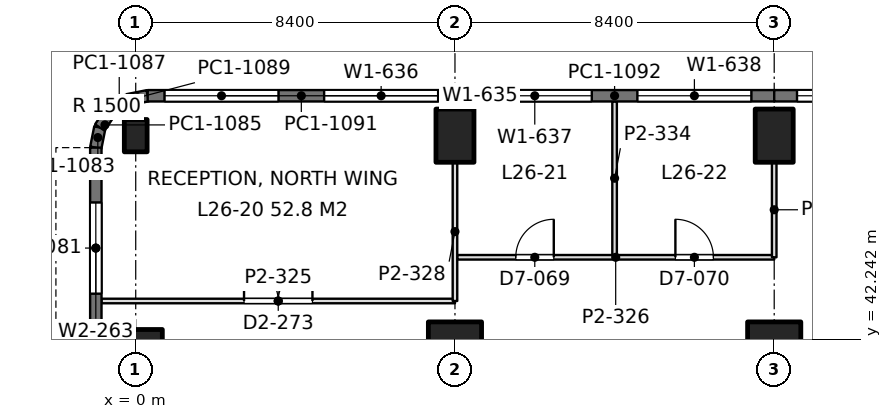
"""IFC4 building model, lengths in metres.
Left out: names, types, materials, properties, quantities, classifications, styles, units other than length and angle.
Written with IfcOpenShell. Run it as: python <this file> out.ifc"""

import sys

from ifc_helpers import new_model, si_unit, direction, frame, frame_2d, origin, origin_2d, place, context, subcontext, project, spatial, rectangle, extrude, element, fill, save


model = new_model("IFC4")
c1 = context("Model", 3, precision=1e-05, world=origin(), true_north=direction((0.0, 1.0)))
c2 = subcontext(c1, "Body", "Model", "MODEL_VIEW")
j1 = project(units=[si_unit("LENGTHUNIT", "METRE"), si_unit("PLANEANGLEUNIT", "RADIAN")], contexts=[c1])
p1 = place(None, origin())
s1 = spatial("IfcSite", under=j1, at=p1, CompositionType="ELEMENT")
p2 = place(p1, origin())
s2 = spatial("IfcBuilding", under=s1, at=p2, CompositionType="ELEMENT")
p3 = place(p2, frame((0.0, 0.0, 117.6)))
s3 = spatial("IfcBuildingStorey", under=s2, at=p3, CompositionType="ELEMENT", Elevation=117.6)
p4 = place(p3, frame((0.0, 42.0, 0.0), z_axis=(0.0, 0.0, 1.0), x_axis=(0.0, 1.0, 0.0)))
e1 = element("IfcColumn", 1, at=p4, inside=s3, PredefinedType="COLUMN", context=c2, shape_type="SweptSolid", body=[
    extrude(rectangle(XDim=1.0, YDim=1.4, at=origin_2d()), origin(), (0.0, 0.0, 1.0), 4.2),
])
p5 = place(p3, frame((0.0, 47.6, 0.0), z_axis=(0.0, 0.0, 1.0), x_axis=(1.0, 0.0, 0.0)))
e2 = element("IfcColumn", 2, at=p5, inside=s3, PredefinedType="COLUMN", context=c2, shape_type="SweptSolid", body=[
    extrude(rectangle(XDim=0.6, YDim=0.85, at=origin_2d()), origin(), (0.0, 0.0, 1.0), 4.2),
])
p6 = place(p3, frame((8.4, 42.0, 0.0), z_axis=(0.0, 0.0, 1.0), x_axis=(1.0, 0.0, 0.0)))
e3 = element("IfcColumn", 3, at=p6, inside=s3, PredefinedType="COLUMN", context=c2, shape_type="SweptSolid", body=[
    extrude(rectangle(XDim=1.4, YDim=1.4, at=origin_2d()), origin(), (0.0, 0.0, 1.0), 4.2),
])
p7 = place(p3, frame((8.4, 47.6, 0.0), z_axis=(0.0, 0.0, 1.0), x_axis=(1.0, 0.0, 0.0)))
e4 = element("IfcColumn", 4, at=p7, inside=s3, PredefinedType="COLUMN", context=c2, shape_type="SweptSolid", body=[
    extrude(rectangle(XDim=1.0, YDim=1.4, at=origin_2d()), origin(), (0.0, 0.0, 1.0), 4.2),
])
p8 = place(p3, frame((16.8, 42.0, 0.0), z_axis=(0.0, 0.0, 1.0), x_axis=(1.0, 0.0, 0.0)))
e5 = element("IfcColumn", 5, at=p8, inside=s3, PredefinedType="COLUMN", context=c2, shape_type="SweptSolid", body=[
    extrude(rectangle(XDim=1.4, YDim=1.4, at=origin_2d()), origin(), (0.0, 0.0, 1.0), 4.2),
])
p9 = place(p3, frame((16.8, 47.6, 0.0), z_axis=(0.0, 0.0, 1.0), x_axis=(1.0, 0.0, 0.0)))
e6 = element("IfcColumn", 6, at=p9, inside=s3, PredefinedType="COLUMN", context=c2, shape_type="SweptSolid", body=[
    extrude(rectangle(XDim=1.0, YDim=1.4, at=origin_2d()), origin(), (0.0, 0.0, 1.0), 4.2),
])
p10 = place(p3, frame((-1.05, 42.0, 0.0), z_axis=(0.0, 0.0, 1.0), x_axis=(0.0, 1.0, 0.0)))
e7 = element("IfcWall", 7, at=p10, inside=s3, PredefinedType="SOLIDWALL", context=c2, shape_type="SweptSolid", body=[
    extrude(rectangle(XDim=5.285, YDim=0.3, at=frame_2d((2.643, 0.0))), origin(), (0.0, 0.0, 1.0), 4.05),
])
p11 = place(p10, frame((1.443, 0.0, 0.9)))
e8 = element("IfcOpeningElement", 8, at=p11, cuts=e7, PredefinedType="OPENING", context=c2, shape_type="SweptSolid", body=[
    extrude(rectangle(XDim=2.4, YDim=1.9, at=frame_2d((1.2, 0.95))), frame((0.0, 0.16, 0.0), z_axis=(0.0, -1.0, 0.0), x_axis=(1.0, 0.0, 0.0)), (0.0, 0.0, 1.0), 0.32),
])
p12 = place(p3, frame((-1.05, 47.285, 0.0), z_axis=(0.0, 0.0, 1.0), x_axis=(0.195073962632, 0.980788534345, 0.0)))
e9 = element("IfcWall", 9, at=p12, inside=s3, PredefinedType="SOLIDWALL", context=c2, shape_type="SweptSolid", body=[
    extrude(rectangle(XDim=0.541, YDim=0.3, at=frame_2d((0.271, 0.0))), origin(), (0.0, 0.0, 1.0), 4.05),
])
p13 = place(p3, frame((-0.945, 47.815, 0.0), z_axis=(0.0, 0.0, 1.0), x_axis=(0.55534295404, 0.831621430339, 0.0)))
e10 = element("IfcWall", 10, at=p13, inside=s3, PredefinedType="SOLIDWALL", context=c2, shape_type="SweptSolid", body=[
    extrude(rectangle(XDim=0.526, YDim=0.3, at=frame_2d((0.263, 0.0))), origin(), (0.0, 0.0, 1.0), 4.05),
])
p14 = place(p3, frame((-0.653, 48.253, 0.0), z_axis=(0.0, 0.0, 1.0), x_axis=(0.831692711774, 0.555236195849, 0.0)))
e11 = element("IfcWall", 11, at=p14, inside=s3, PredefinedType="SOLIDWALL", context=c2, shape_type="SweptSolid", body=[
    extrude(rectangle(XDim=0.525, YDim=0.3, at=frame_2d((0.263, 0.0))), origin(), (0.0, 0.0, 1.0), 4.05),
])
p15 = place(p3, frame((-0.216, 48.544, 0.0), z_axis=(0.0, 0.0, 1.0), x_axis=(0.980788534345, 0.195073962632, 0.0)))
e12 = element("IfcWall", 12, at=p15, inside=s3, PredefinedType="SOLIDWALL", context=c2, shape_type="SweptSolid", body=[
    extrude(rectangle(XDim=0.541, YDim=0.3, at=frame_2d((0.271, 0.0))), origin(), (0.0, 0.0, 1.0), 4.05),
])
p16 = place(p3, frame((0.315, 48.65, 0.0), z_axis=(0.0, 0.0, 1.0), x_axis=(1.0, 0.0, 0.0)))
e13 = element("IfcWall", 13, at=p16, inside=s3, PredefinedType="SOLIDWALL", context=c2, shape_type="SweptSolid", body=[
    extrude(rectangle(XDim=8.085, YDim=0.3, at=frame_2d((4.042, 0.0))), origin(), (0.0, 0.0, 1.0), 4.05),
])
p17 = place(p16, frame((0.443, 0.0, 0.9)))
e14 = element("IfcOpeningElement", 14, at=p17, cuts=e13, PredefinedType="OPENING", context=c2, shape_type="SweptSolid", body=[
    extrude(rectangle(XDim=3.0, YDim=1.9, at=frame_2d((1.5, 0.95))), frame((0.0, 0.16, 0.0), z_axis=(0.0, -1.0, 0.0), x_axis=(1.0, 0.0, 0.0)), (0.0, 0.0, 1.0), 0.32),
])
p18 = place(p16, frame((4.643, 0.0, 0.9)))
e15 = element("IfcOpeningElement", 15, at=p18, cuts=e13, PredefinedType="OPENING", context=c2, shape_type="SweptSolid", body=[
    extrude(rectangle(XDim=3.0, YDim=1.9, at=frame_2d((1.5, 0.95))), frame((0.0, 0.16, 0.0), z_axis=(0.0, -1.0, 0.0), x_axis=(1.0, 0.0, 0.0)), (0.0, 0.0, 1.0), 0.32),
])
p19 = place(p3, frame((8.4, 48.65, 0.0), z_axis=(0.0, 0.0, 1.0), x_axis=(1.0, 0.0, 0.0)))
e16 = element("IfcWall", 16, at=p19, inside=s3, PredefinedType="SOLIDWALL", context=c2, shape_type="SweptSolid", body=[
    extrude(rectangle(XDim=8.4, YDim=0.3, at=frame_2d((4.2, 0.0))), origin(), (0.0, 0.0, 1.0), 4.05),
])
p20 = place(p19, frame((0.6, 0.0, 0.9)))
e17 = element("IfcOpeningElement", 17, at=p20, cuts=e16, PredefinedType="OPENING", context=c2, shape_type="SweptSolid", body=[
    extrude(rectangle(XDim=3.0, YDim=1.9, at=frame_2d((1.5, 0.95))), frame((0.0, 0.16, 0.0), z_axis=(0.0, -1.0, 0.0), x_axis=(1.0, 0.0, 0.0)), (0.0, 0.0, 1.0), 0.32),
])
p21 = place(p19, frame((4.8, 0.0, 0.9)))
e18 = element("IfcOpeningElement", 18, at=p21, cuts=e16, PredefinedType="OPENING", context=c2, shape_type="SweptSolid", body=[
    extrude(rectangle(XDim=3.0, YDim=1.9, at=frame_2d((1.5, 0.95))), frame((0.0, 0.16, 0.0), z_axis=(0.0, -1.0, 0.0), x_axis=(1.0, 0.0, 0.0)), (0.0, 0.0, 1.0), 0.32),
])
p22 = place(p3, frame((16.8, 48.65, 0.0), z_axis=(0.0, 0.0, 1.0), x_axis=(1.0, 0.0, 0.0)))
e19 = element("IfcWall", 19, at=p22, inside=s3, PredefinedType="SOLIDWALL", context=c2, shape_type="SweptSolid", body=[
    extrude(rectangle(XDim=8.4, YDim=0.3, at=frame_2d((4.2, 0.0))), origin(), (0.0, 0.0, 1.0), 4.05),
])
p23 = place(p22, frame((0.6, 0.0, 0.9)))
e20 = element("IfcOpeningElement", 20, at=p23, cuts=e19, PredefinedType="OPENING", context=c2, shape_type="SweptSolid", body=[
    extrude(rectangle(XDim=3.0, YDim=1.9, at=frame_2d((1.5, 0.95))), frame((0.0, 0.16, 0.0), z_axis=(0.0, -1.0, 0.0), x_axis=(1.0, 0.0, 0.0)), (0.0, 0.0, 1.0), 0.32),
])
p24 = place(p22, frame((4.8, 0.0, 0.9)))
e21 = element("IfcOpeningElement", 21, at=p24, cuts=e19, PredefinedType="OPENING", context=c2, shape_type="SweptSolid", body=[
    extrude(rectangle(XDim=3.0, YDim=1.9, at=frame_2d((1.5, 0.95))), frame((0.0, 0.16, 0.0), z_axis=(0.0, -1.0, 0.0), x_axis=(1.0, 0.0, 0.0)), (0.0, 0.0, 1.0), 0.32),
])
p25 = place(p3, frame((-0.902, 43.25, 0.0), z_axis=(0.0, 0.0, 1.0), x_axis=(1.0, 0.0, 0.0)))
e22 = element("IfcWall", 22, at=p25, inside=s3, PredefinedType="PARTITIONING", context=c2, shape_type="SweptSolid", body=[
    extrude(rectangle(XDim=9.302, YDim=0.12, at=frame_2d((4.651, 0.0))), origin(), (0.0, 0.0, 1.0), 3.55),
])
p26 = place(p25, frame((3.752, 0.0, 0.0)))
e23 = element("IfcOpeningElement", 23, at=p26, cuts=e22, PredefinedType="OPENING", context=c2, shape_type="SweptSolid", body=[
    extrude(rectangle(XDim=1.8, YDim=2.2, at=frame_2d((0.9, 1.1))), frame((0.0, 0.07, 0.0), z_axis=(0.0, -1.0, 0.0), x_axis=(1.0, 0.0, 0.0)), (0.0, 0.0, 1.0), 0.14),
])
p27 = place(p3, frame((8.458, 44.4, 0.0), z_axis=(0.0, 0.0, 1.0), x_axis=(1.0, 0.0, 0.0)))
e24 = element("IfcWall", 24, at=p27, inside=s3, PredefinedType="PARTITIONING", context=c2, shape_type="SweptSolid", body=[
    extrude(rectangle(XDim=8.342, YDim=0.12, at=frame_2d((4.171, 0.0))), origin(), (0.0, 0.0, 1.0), 3.55),
])
p28 = place(p27, frame((1.542, 0.0, 0.0)))
e25 = element("IfcOpeningElement", 25, at=p28, cuts=e24, PredefinedType="OPENING", context=c2, shape_type="SweptSolid", body=[
    extrude(rectangle(XDim=1.0, YDim=2.4, at=frame_2d((0.5, 1.2))), frame((0.0, 0.07, 0.0), z_axis=(0.0, -1.0, 0.0), x_axis=(1.0, 0.0, 0.0)), (0.0, 0.0, 1.0), 0.14),
])
p29 = place(p27, frame((5.742, 0.0, 0.0)))
e26 = element("IfcOpeningElement", 26, at=p29, cuts=e24, PredefinedType="OPENING", context=c2, shape_type="SweptSolid", body=[
    extrude(rectangle(XDim=1.0, YDim=2.4, at=frame_2d((0.5, 1.2))), frame((0.0, 0.07, 0.0), z_axis=(0.0, -1.0, 0.0), x_axis=(1.0, 0.0, 0.0)), (0.0, 0.0, 1.0), 0.14),
])
p30 = place(p3, frame((8.4, 43.25, 0.0), z_axis=(0.0, 0.0, 1.0), x_axis=(0.0, 1.0, 0.0)))
e27 = element("IfcWall", 27, at=p30, inside=s3, PredefinedType="PARTITIONING", context=c2, shape_type="SweptSolid", body=[
    extrude(rectangle(XDim=3.651, YDim=0.12, at=frame_2d((1.825, 0.0))), origin(), (0.0, 0.0, 1.0), 3.55),
])
p31 = place(p3, frame((12.6, 44.458, 0.0), z_axis=(0.0, 0.0, 1.0), x_axis=(0.0, 1.0, 0.0)))
e28 = element("IfcWall", 28, at=p31, inside=s3, PredefinedType="PARTITIONING", context=c2, shape_type="SweptSolid", body=[
    extrude(rectangle(XDim=4.044, YDim=0.12, at=frame_2d((2.022, 0.0))), origin(), (0.0, 0.0, 1.0), 3.56),
])
p32 = place(p3, frame((16.8, 44.4, 0.0), z_axis=(0.0, 0.0, 1.0), x_axis=(0.0, 1.0, 0.0)))
e29 = element("IfcWall", 29, at=p32, inside=s3, PredefinedType="PARTITIONING", context=c2, shape_type="SweptSolid", body=[
    extrude(rectangle(XDim=2.501, YDim=0.12, at=frame_2d((1.25, 0.0))), origin(), (0.0, 0.0, 1.0), 3.55),
])
p33 = place(p11, origin())
e30 = element("IfcWindow", 30, at=p33, inside=s3, PartitioningType="SINGLE_PANEL", PredefinedType="WINDOW", context=c2, shape_type="SweptSolid", body=[
    extrude(rectangle(XDim=2.4, YDim=1.9, at=frame_2d((1.2, 0.95))), frame((0.0, 0.03, 0.0), z_axis=(0.0, -1.0, 0.0), x_axis=(1.0, 0.0, 0.0)), (0.0, 0.0, 1.0), 0.06),
])
fill(e8, e30)
p34 = place(p17, origin())
e31 = element("IfcWindow", 31, at=p34, inside=s3, PartitioningType="SINGLE_PANEL", PredefinedType="WINDOW", context=c2, shape_type="SweptSolid", body=[
    extrude(rectangle(XDim=3.0, YDim=1.9, at=frame_2d((1.5, 0.95))), frame((0.0, 0.03, 0.0), z_axis=(0.0, -1.0, 0.0), x_axis=(1.0, 0.0, 0.0)), (0.0, 0.0, 1.0), 0.06),
])
fill(e14, e31)
p35 = place(p18, origin())
e32 = element("IfcWindow", 32, at=p35, inside=s3, PartitioningType="SINGLE_PANEL", PredefinedType="WINDOW", context=c2, shape_type="SweptSolid", body=[
    extrude(rectangle(XDim=3.0, YDim=1.9, at=frame_2d((1.5, 0.95))), frame((0.0, 0.03, 0.0), z_axis=(0.0, -1.0, 0.0), x_axis=(1.0, 0.0, 0.0)), (0.0, 0.0, 1.0), 0.06),
])
fill(e15, e32)
p36 = place(p20, origin())
e33 = element("IfcWindow", 33, at=p36, inside=s3, PartitioningType="SINGLE_PANEL", PredefinedType="WINDOW", context=c2, shape_type="SweptSolid", body=[
    extrude(rectangle(XDim=3.0, YDim=1.9, at=frame_2d((1.5, 0.95))), frame((0.0, 0.03, 0.0), z_axis=(0.0, -1.0, 0.0), x_axis=(1.0, 0.0, 0.0)), (0.0, 0.0, 1.0), 0.06),
])
fill(e17, e33)
p37 = place(p21, origin())
e34 = element("IfcWindow", 34, at=p37, inside=s3, PartitioningType="SINGLE_PANEL", PredefinedType="WINDOW", context=c2, shape_type="SweptSolid", body=[
    extrude(rectangle(XDim=3.0, YDim=1.9, at=frame_2d((1.5, 0.95))), frame((0.0, 0.03, 0.0), z_axis=(0.0, -1.0, 0.0), x_axis=(1.0, 0.0, 0.0)), (0.0, 0.0, 1.0), 0.06),
])
fill(e18, e34)
p38 = place(p23, origin())
e35 = element("IfcWindow", 35, at=p38, inside=s3, PartitioningType="SINGLE_PANEL", PredefinedType="WINDOW", context=c2, shape_type="SweptSolid", body=[
    extrude(rectangle(XDim=3.0, YDim=1.9, at=frame_2d((1.5, 0.95))), frame((0.0, 0.03, 0.0), z_axis=(0.0, -1.0, 0.0), x_axis=(1.0, 0.0, 0.0)), (0.0, 0.0, 1.0), 0.06),
])
fill(e20, e35)
p39 = place(p26, origin())
e36 = element("IfcDoor", 36, at=p39, inside=s3, OperationType="DOUBLE_DOOR_SINGLE_SWING", PredefinedType="DOOR", context=c2, shape_type="SweptSolid", body=[
    extrude(rectangle(XDim=1.8, YDim=2.2, at=frame_2d((0.9, 1.1))), frame((0.0, 0.025, 0.0), z_axis=(0.0, -1.0, 0.0), x_axis=(1.0, 0.0, 0.0)), (0.0, 0.0, 1.0), 0.05),
])
fill(e23, e36)
p40 = place(p28, origin())
e37 = element("IfcDoor", 37, at=p40, inside=s3, OperationType="SINGLE_SWING_RIGHT", PredefinedType="DOOR", context=c2, shape_type="SweptSolid", body=[
    extrude(rectangle(XDim=1.0, YDim=2.4, at=frame_2d((0.5, 1.2))), frame((0.0, 0.025, 0.0), z_axis=(0.0, -1.0, 0.0), x_axis=(1.0, 0.0, 0.0)), (0.0, 0.0, 1.0), 0.05),
])
fill(e25, e37)
p41 = place(p29, origin())
e38 = element("IfcDoor", 38, at=p41, inside=s3, OperationType="SINGLE_SWING_LEFT", PredefinedType="DOOR", context=c2, shape_type="SweptSolid", body=[
    extrude(rectangle(XDim=1.0, YDim=2.4, at=frame_2d((0.5, 1.2))), frame((0.0, 0.025, 0.0), z_axis=(0.0, -1.0, 0.0), x_axis=(1.0, 0.0, 0.0)), (0.0, 0.0, 1.0), 0.05),
])
fill(e26, e38)
save(model, sys.argv[1])
